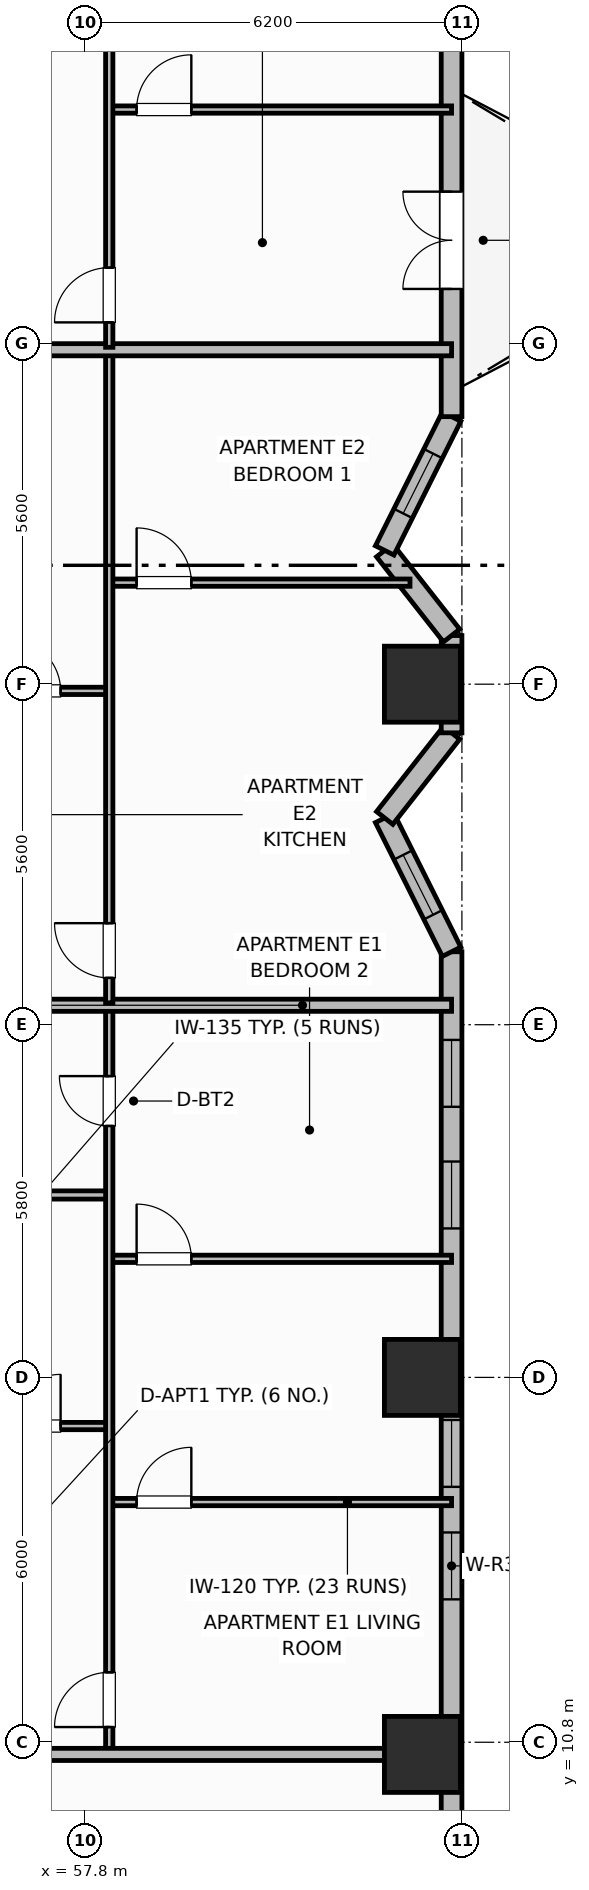
"""IFC4 building model, lengths in metres.
Left out: names, types, materials, properties, quantities, classifications, styles, units other than length and angle.
Written with IfcOpenShell. Run it as: python <this file> out.ifc"""

import sys

from ifc_helpers import new_model, si_unit, direction, frame, frame_2d, origin, origin_2d, place, context, subcontext, project, spatial, rectangle, extrude, element, fill, save


model = new_model("IFC4")
c1 = context("Model", 3, precision=1e-05, world=origin(), true_north=direction((0.0, 1.0)))
c2 = subcontext(c1, "Body", "Model", "MODEL_VIEW")
j1 = project(units=[si_unit("LENGTHUNIT", "METRE"), si_unit("PLANEANGLEUNIT", "RADIAN")], contexts=[c1])
p1 = place(None, origin())
s1 = spatial("IfcSite", under=j1, at=p1, CompositionType="ELEMENT")
p2 = place(p1, origin())
s2 = spatial("IfcBuilding", under=s1, at=p2, CompositionType="ELEMENT")
p3 = place(p2, frame((0.0, 0.0, 69.5)))
s3 = spatial("IfcBuildingStorey", under=s2, at=p3, CompositionType="ELEMENT", Elevation=69.5)
for number, where, z_axis, x_axis in (
    (1, (63.35, 10.6, 0.0), (0.0, 0.0, 1.0), (1.0, 0.0, 0.0)),
    (2, (63.35, 16.8, 0.0), (0.0, 0.0, 1.0), (1.0, 0.0, 0.0)),
    (3, (63.35, 28.2, 0.0), (0.0, 0.0, 1.0), (1.0, 0.0, 0.0)),
):
    element("IfcColumn", number, at=place(p3, frame(where, z_axis=z_axis, x_axis=x_axis)), inside=s3, PredefinedType="COLUMN", context=c2, shape_type="SweptSolid", body=[
        extrude(rectangle(XDim=1.25, YDim=1.25, at=origin_2d()), origin(), (0.0, 0.0, 1.0), 3.7),
    ])
p4 = place(p3, frame((63.83, 9.0, 0.0), z_axis=(0.0, 0.0, 1.0), x_axis=(0.0, 1.0, 0.0)))
e4 = element("IfcWall", 4, at=p4, inside=s3, PredefinedType="SOLIDWALL", context=c2, shape_type="SweptSolid", body=[
    extrude(rectangle(XDim=14.8, YDim=0.34, at=frame_2d((7.4, 0.0))), origin(), (0.0, 0.0, 1.0), 2.7),
])
p5 = place(p4, frame((4.15, 0.0, 0.93)))
e5 = element("IfcOpeningElement", 5, at=p5, cuts=e4, PredefinedType="OPENING", context=c2, shape_type="SweptSolid", body=[
    extrude(rectangle(XDim=1.1, YDim=1.65, at=frame_2d((0.55, 0.825))), frame((0.0, 0.18, 0.0), z_axis=(0.0, -1.0, 0.0), x_axis=(1.0, 0.0, 0.0)), (0.0, 0.0, 1.0), 0.36),
])
p6 = place(p4, frame((6.0, 0.0, 0.89)))
e6 = element("IfcOpeningElement", 6, at=p6, cuts=e4, PredefinedType="OPENING", context=c2, shape_type="SweptSolid", body=[
    extrude(rectangle(XDim=1.1, YDim=1.65, at=frame_2d((0.55, 0.825))), frame((0.0, 0.18, 0.0), z_axis=(0.0, -1.0, 0.0), x_axis=(1.0, 0.0, 0.0)), (0.0, 0.0, 1.0), 0.36),
])
p7 = place(p4, frame((10.25, 0.0, 0.93)))
e7 = element("IfcOpeningElement", 7, at=p7, cuts=e4, PredefinedType="OPENING", context=c2, shape_type="SweptSolid", body=[
    extrude(rectangle(XDim=1.1, YDim=1.65, at=frame_2d((0.55, 0.825))), frame((0.0, 0.18, 0.0), z_axis=(0.0, -1.0, 0.0), x_axis=(1.0, 0.0, 0.0)), (0.0, 0.0, 1.0), 0.36),
])
p8 = place(p4, frame((12.25, 0.0, 0.93)))
e8 = element("IfcOpeningElement", 8, at=p8, cuts=e4, PredefinedType="OPENING", context=c2, shape_type="SweptSolid", body=[
    extrude(rectangle(XDim=1.1, YDim=1.65, at=frame_2d((0.55, 0.825))), frame((0.0, 0.18, 0.0), z_axis=(0.0, -1.0, 0.0), x_axis=(1.0, 0.0, 0.0)), (0.0, 0.0, 1.0), 0.36),
])
p9 = place(p3, frame((63.83, 23.8, 0.0), z_axis=(0.0, 0.0, 1.0), x_axis=(-0.447253297971, 0.894407338663, 0.0)))
e9 = element("IfcWall", 9, at=p9, inside=s3, PredefinedType="SOLIDWALL", context=c2, shape_type="SweptSolid", body=[
    extrude(rectangle(XDim=2.46, YDim=0.34, at=frame_2d((1.23, 0.0))), origin(), (0.0, 0.0, 1.0), 2.7),
])
p10 = place(p9, frame((0.68, 0.0, 0.89)))
e10 = element("IfcOpeningElement", 10, at=p10, cuts=e9, PredefinedType="OPENING", context=c2, shape_type="SweptSolid", body=[
    extrude(rectangle(XDim=1.1, YDim=1.65, at=frame_2d((0.55, 0.825))), frame((0.0, 0.18, 0.0), z_axis=(0.0, -1.0, 0.0), x_axis=(1.0, 0.0, 0.0)), (0.0, 0.0, 1.0), 0.36),
])
p11 = place(p3, frame((62.73, 26.0, 0.0), z_axis=(0.0, 0.0, 1.0), x_axis=(0.617882109729, 0.786270753925, 0.0)))
e11 = element("IfcWall", 11, at=p11, inside=s3, PredefinedType="SOLIDWALL", context=c2, shape_type="SweptSolid", body=[
    extrude(rectangle(XDim=1.781, YDim=0.34, at=frame_2d((0.89, 0.0))), origin(), (0.0, 0.0, 1.0), 2.7),
])
p12 = place(p3, frame((63.83, 27.4, 0.0), z_axis=(0.0, 0.0, 1.0), x_axis=(0.0, 1.0, 0.0)))
e12 = element("IfcWall", 12, at=p12, inside=s3, PredefinedType="SOLIDWALL", context=c2, shape_type="SweptSolid", body=[
    extrude(rectangle(XDim=1.6, YDim=0.34, at=frame_2d((0.8, 0.0))), origin(), (0.0, 0.0, 1.0), 2.7),
])
p13 = place(p3, frame((63.83, 29.0, 0.0), z_axis=(0.0, 0.0, 1.0), x_axis=(-0.617882109729, 0.786270753925, 0.0)))
e13 = element("IfcWall", 13, at=p13, inside=s3, PredefinedType="SOLIDWALL", context=c2, shape_type="SweptSolid", body=[
    extrude(rectangle(XDim=1.781, YDim=0.34, at=frame_2d((0.89, 0.0))), origin(), (0.0, 0.0, 1.0), 2.7),
])
p14 = place(p3, frame((62.73, 30.4, 0.0), z_axis=(0.0, 0.0, 1.0), x_axis=(0.4472135955, 0.894427191, 0.0)))
e14 = element("IfcWall", 14, at=p14, inside=s3, PredefinedType="SOLIDWALL", context=c2, shape_type="SweptSolid", body=[
    extrude(rectangle(XDim=2.46, YDim=0.34, at=frame_2d((1.23, 0.0))), origin(), (0.0, 0.0, 1.0), 2.7),
])
p15 = place(p14, frame((0.68, 0.0, 0.89)))
e15 = element("IfcOpeningElement", 15, at=p15, cuts=e14, PredefinedType="OPENING", context=c2, shape_type="SweptSolid", body=[
    extrude(rectangle(XDim=1.1, YDim=1.65, at=frame_2d((0.55, 0.825))), frame((0.0, 0.18, 0.0), z_axis=(0.0, -1.0, 0.0), x_axis=(1.0, 0.0, 0.0)), (0.0, 0.0, 1.0), 0.36),
])
p16 = place(p3, frame((63.83, 32.6, 0.0), z_axis=(0.0, 0.0, 1.0), x_axis=(0.0, 1.0, 0.0)))
e16 = element("IfcWall", 16, at=p16, inside=s3, PredefinedType="SOLIDWALL", context=c2, shape_type="SweptSolid", body=[
    extrude(rectangle(XDim=14.8, YDim=0.34, at=frame_2d((7.4, 0.0))), origin(), (0.0, 0.0, 1.0), 2.7),
])
p17 = place(p16, frame((2.1, 0.0, 0.0)))
e17 = element("IfcOpeningElement", 17, at=p17, cuts=e16, PredefinedType="OPENING", context=c2, shape_type="SweptSolid", body=[
    extrude(rectangle(XDim=1.6, YDim=2.1, at=frame_2d((0.8, 1.05))), frame((0.0, 0.18, 0.0), z_axis=(0.0, -1.0, 0.0), x_axis=(1.0, 0.0, 0.0)), (0.0, 0.0, 1.0), 0.36),
])
p18 = place(p16, frame((7.68, 0.0, 0.89)))
e18 = element("IfcOpeningElement", 18, at=p18, cuts=e16, PredefinedType="OPENING", context=c2, shape_type="SweptSolid", body=[
    extrude(rectangle(XDim=1.1, YDim=1.65, at=frame_2d((0.55, 0.825))), frame((0.0, 0.18, 0.0), z_axis=(0.0, -1.0, 0.0), x_axis=(1.0, 0.0, 0.0)), (0.0, 0.0, 1.0), 0.36),
])
p19 = place(p16, frame((9.8, 0.0, 0.68)))
e19 = element("IfcOpeningElement", 19, at=p19, cuts=e16, PredefinedType="OPENING", context=c2, shape_type="SweptSolid", body=[
    extrude(rectangle(XDim=2.1, YDim=1.9, at=frame_2d((1.05, 0.95))), frame((0.0, 0.18, 0.0), z_axis=(0.0, -1.0, 0.0), x_axis=(1.0, 0.0, 0.0)), (0.0, 0.0, 1.0), 0.36),
])
p20 = place(p3, frame((55.95, 16.0, 0.0), z_axis=(0.0, 0.0, 1.0), x_axis=(1.0, 0.0, 0.0)))
e20 = element("IfcWall", 20, at=p20, inside=s3, PredefinedType="PARTITIONING", context=c2, shape_type="SweptSolid", body=[
    extrude(rectangle(XDim=2.25, YDim=0.12, at=frame_2d((1.125, 0.0))), origin(), (0.0, 0.0, 1.0), 2.53),
])
p21 = place(p20, frame((0.6, 0.0, 0.0)))
e21 = element("IfcOpeningElement", 21, at=p21, cuts=e20, PredefinedType="OPENING", context=c2, shape_type="SweptSolid", body=[
    extrude(rectangle(XDim=0.85, YDim=2.1, at=frame_2d((0.425, 1.05))), frame((0.0, 0.07, 0.0), z_axis=(0.0, -1.0, 0.0), x_axis=(1.0, 0.0, 0.0)), (0.0, 0.0, 1.0), 0.14),
])
p22 = place(p3, frame((55.95, 19.8, 0.0), z_axis=(0.0, 0.0, 1.0), x_axis=(1.0, 0.0, 0.0)))
e22 = element("IfcWall", 22, at=p22, inside=s3, PredefinedType="PARTITIONING", context=c2, shape_type="SweptSolid", body=[
    extrude(rectangle(XDim=2.25, YDim=0.135, at=frame_2d((1.125, 0.0))), origin(), (0.0, 0.0, 1.0), 2.53),
])
p23 = place(p3, frame((58.2, 14.75, 0.0), z_axis=(0.0, 0.0, 1.0), x_axis=(1.0, 0.0, 0.0)))
e23 = element("IfcWall", 23, at=p23, inside=s3, PredefinedType="PARTITIONING", context=c2, shape_type="SweptSolid", body=[
    extrude(rectangle(XDim=5.63, YDim=0.12, at=frame_2d((2.815, 0.0))), origin(), (0.0, 0.0, 1.0), 2.53),
])
p24 = place(p23, frame((0.45, 0.0, 0.0)))
e24 = element("IfcOpeningElement", 24, at=p24, cuts=e23, PredefinedType="OPENING", context=c2, shape_type="SweptSolid", body=[
    extrude(rectangle(XDim=0.9, YDim=2.1, at=frame_2d((0.45, 1.05))), frame((0.0, 0.07, 0.0), z_axis=(0.0, -1.0, 0.0), x_axis=(1.0, 0.0, 0.0)), (0.0, 0.0, 1.0), 0.14),
])
p25 = place(p3, frame((58.2, 18.75, 0.0), z_axis=(0.0, 0.0, 1.0), x_axis=(1.0, 0.0, 0.0)))
e25 = element("IfcWall", 25, at=p25, inside=s3, PredefinedType="PARTITIONING", context=c2, shape_type="SweptSolid", body=[
    extrude(rectangle(XDim=5.63, YDim=0.12, at=frame_2d((2.815, 0.0))), origin(), (0.0, 0.0, 1.0), 2.53),
])
p26 = place(p25, frame((0.45, 0.0, 0.0)))
e26 = element("IfcOpeningElement", 26, at=p26, cuts=e25, PredefinedType="OPENING", context=c2, shape_type="SweptSolid", body=[
    extrude(rectangle(XDim=0.9, YDim=2.1, at=frame_2d((0.45, 1.05))), frame((0.0, 0.07, 0.0), z_axis=(0.0, -1.0, 0.0), x_axis=(1.0, 0.0, 0.0)), (0.0, 0.0, 1.0), 0.14),
])
p27 = place(p3, frame((58.2, 10.64, 0.0), z_axis=(0.0, 0.0, 1.0), x_axis=(0.0, 1.0, 0.0)))
e27 = element("IfcWall", 27, at=p27, inside=s3, PredefinedType="PARTITIONING", context=c2, shape_type="SweptSolid", body=[
    extrude(rectangle(XDim=12.24, YDim=0.12, at=frame_2d((6.12, 0.0))), origin(), (0.0, 0.0, 1.0), 2.53),
])
p28 = place(p27, frame((0.41, 0.0, 0.0)))
e28 = element("IfcOpeningElement", 28, at=p28, cuts=e27, PredefinedType="OPENING", context=c2, shape_type="SweptSolid", body=[
    extrude(rectangle(XDim=0.9, YDim=2.1, at=frame_2d((0.45, 1.05))), frame((0.0, 0.07, 0.0), z_axis=(0.0, -1.0, 0.0), x_axis=(1.0, 0.0, 0.0)), (0.0, 0.0, 1.0), 0.14),
])
p29 = place(p27, frame((10.295, 0.0, 0.0)))
e29 = element("IfcOpeningElement", 29, at=p29, cuts=e27, PredefinedType="OPENING", context=c2, shape_type="SweptSolid", body=[
    extrude(rectangle(XDim=0.82, YDim=2.08, at=frame_2d((0.41, 1.04))), frame((0.0, 0.07, 0.0), z_axis=(0.0, -1.0, 0.0), x_axis=(1.0, 0.0, 0.0)), (0.0, 0.0, 1.0), 0.14),
])
p30 = place(p3, frame((55.95, 22.92, 0.0), z_axis=(0.0, 0.0, 1.0), x_axis=(1.0, 0.0, 0.0)))
e30 = element("IfcWall", 30, at=p30, inside=s3, PredefinedType="PARTITIONING", context=c2, shape_type="SweptSolid", body=[
    extrude(rectangle(XDim=7.88, YDim=0.2, at=frame_2d((3.94, 0.0))), origin(), (0.0, 0.0, 1.0), 2.53),
])
p31 = place(p3, frame((55.95, 28.09, 0.0), z_axis=(0.0, 0.0, 1.0), x_axis=(1.0, 0.0, 0.0)))
e31 = element("IfcWall", 31, at=p31, inside=s3, PredefinedType="PARTITIONING", context=c2, shape_type="SweptSolid", body=[
    extrude(rectangle(XDim=2.25, YDim=0.12, at=frame_2d((1.125, 0.0))), origin(), (0.0, 0.0, 1.0), 2.53),
])
p32 = place(p31, frame((0.6, 0.0, 0.0)))
e32 = element("IfcOpeningElement", 32, at=p32, cuts=e31, PredefinedType="OPENING", context=c2, shape_type="SweptSolid", body=[
    extrude(rectangle(XDim=0.85, YDim=2.1, at=frame_2d((0.425, 1.05))), frame((0.0, 0.07, 0.0), z_axis=(0.0, -1.0, 0.0), x_axis=(1.0, 0.0, 0.0)), (0.0, 0.0, 1.0), 0.14),
])
p33 = place(p3, frame((58.2, 29.87, 0.0), z_axis=(0.0, 0.0, 1.0), x_axis=(1.0, 0.0, 0.0)))
e33 = element("IfcWall", 33, at=p33, inside=s3, PredefinedType="PARTITIONING", context=c2, shape_type="SweptSolid", body=[
    extrude(rectangle(XDim=4.947, YDim=0.12, at=frame_2d((2.473, 0.0))), origin(), (0.0, 0.0, 1.0), 2.53),
])
p34 = place(p33, frame((0.45, 0.0, 0.0)))
e34 = element("IfcOpeningElement", 34, at=p34, cuts=e33, PredefinedType="OPENING", context=c2, shape_type="SweptSolid", body=[
    extrude(rectangle(XDim=0.9, YDim=2.1, at=frame_2d((0.45, 1.05))), frame((0.0, 0.07, 0.0), z_axis=(0.0, -1.0, 0.0), x_axis=(1.0, 0.0, 0.0)), (0.0, 0.0, 1.0), 0.14),
])
p35 = place(p3, frame((58.2, 22.96, 0.0), z_axis=(0.0, 0.0, 1.0), x_axis=(0.0, 1.0, 0.0)))
e35 = element("IfcWall", 35, at=p35, inside=s3, PredefinedType="PARTITIONING", context=c2, shape_type="SweptSolid", body=[
    extrude(rectangle(XDim=10.7, YDim=0.12, at=frame_2d((5.35, 0.0))), origin(), (0.0, 0.0, 1.0), 2.53),
])
p36 = place(p35, frame((0.41, 0.0, 0.0)))
e36 = element("IfcOpeningElement", 36, at=p36, cuts=e35, PredefinedType="OPENING", context=c2, shape_type="SweptSolid", body=[
    extrude(rectangle(XDim=0.9, YDim=2.1, at=frame_2d((0.45, 1.05))), frame((0.0, 0.07, 0.0), z_axis=(0.0, -1.0, 0.0), x_axis=(1.0, 0.0, 0.0)), (0.0, 0.0, 1.0), 0.14),
])
p37 = place(p3, frame((55.95, 33.7, 0.0), z_axis=(0.0, 0.0, 1.0), x_axis=(1.0, 0.0, 0.0)))
e37 = element("IfcWall", 37, at=p37, inside=s3, PredefinedType="PARTITIONING", context=c2, shape_type="SweptSolid", body=[
    extrude(rectangle(XDim=7.88, YDim=0.2, at=frame_2d((3.94, 0.0))), origin(), (0.0, 0.0, 1.0), 2.53),
])
p38 = place(p3, frame((58.2, 37.65, 0.0), z_axis=(0.0, 0.0, 1.0), x_axis=(1.0, 0.0, 0.0)))
e38 = element("IfcWall", 38, at=p38, inside=s3, PredefinedType="PARTITIONING", context=c2, shape_type="SweptSolid", body=[
    extrude(rectangle(XDim=5.63, YDim=0.12, at=frame_2d((2.815, 0.0))), origin(), (0.0, 0.0, 1.0), 2.53),
])
p39 = place(p38, frame((0.45, 0.0, 0.0)))
e39 = element("IfcOpeningElement", 39, at=p39, cuts=e38, PredefinedType="OPENING", context=c2, shape_type="SweptSolid", body=[
    extrude(rectangle(XDim=0.9, YDim=2.1, at=frame_2d((0.45, 1.05))), frame((0.0, 0.07, 0.0), z_axis=(0.0, -1.0, 0.0), x_axis=(1.0, 0.0, 0.0)), (0.0, 0.0, 1.0), 0.14),
])
p40 = place(p3, frame((58.2, 33.74, 0.0), z_axis=(0.0, 0.0, 1.0), x_axis=(0.0, 1.0, 0.0)))
e40 = element("IfcWall", 40, at=p40, inside=s3, PredefinedType="PARTITIONING", context=c2, shape_type="SweptSolid", body=[
    extrude(rectangle(XDim=12.02, YDim=0.12, at=frame_2d((6.01, 0.0))), origin(), (0.0, 0.0, 1.0), 2.53),
])
p41 = place(p40, frame((0.41, 0.0, 0.0)))
e41 = element("IfcOpeningElement", 41, at=p41, cuts=e40, PredefinedType="OPENING", context=c2, shape_type="SweptSolid", body=[
    extrude(rectangle(XDim=0.9, YDim=2.1, at=frame_2d((0.45, 1.05))), frame((0.0, 0.07, 0.0), z_axis=(0.0, -1.0, 0.0), x_axis=(1.0, 0.0, 0.0)), (0.0, 0.0, 1.0), 0.14),
])
p42 = place(p40, frame((10.185, 0.0, 0.0)))
e42 = element("IfcOpeningElement", 42, at=p42, cuts=e40, PredefinedType="OPENING", context=c2, shape_type="SweptSolid", body=[
    extrude(rectangle(XDim=0.82, YDim=2.08, at=frame_2d((0.41, 1.04))), frame((0.0, 0.07, 0.0), z_axis=(0.0, -1.0, 0.0), x_axis=(1.0, 0.0, 0.0)), (0.0, 0.0, 1.0), 0.14),
])
p43 = place(p3, frame((55.95, 10.6, 0.0), z_axis=(0.0, 0.0, 1.0), x_axis=(1.0, 0.0, 0.0)))
e43 = element("IfcWall", 43, at=p43, inside=s3, PredefinedType="PARTITIONING", context=c2, shape_type="SweptSolid", body=[
    extrude(rectangle(XDim=7.46, YDim=0.2, at=frame_2d((3.73, 0.0))), origin(), (0.0, 0.0, 1.0), 2.53),
])
p44 = place(p5, origin())
e44 = element("IfcWindow", 44, at=p44, inside=s3, PartitioningType="SINGLE_PANEL", PredefinedType="WINDOW", context=c2, shape_type="SweptSolid", body=[
    extrude(rectangle(XDim=1.1, YDim=1.65, at=frame_2d((0.55, 0.825))), frame((0.0, 0.03, 0.0), z_axis=(0.0, -1.0, 0.0), x_axis=(1.0, 0.0, 0.0)), (0.0, 0.0, 1.0), 0.06),
])
fill(e5, e44)
p45 = place(p6, origin())
e45 = element("IfcWindow", 45, at=p45, inside=s3, PartitioningType="SINGLE_PANEL", PredefinedType="WINDOW", context=c2, shape_type="SweptSolid", body=[
    extrude(rectangle(XDim=1.1, YDim=1.65, at=frame_2d((0.55, 0.825))), frame((0.0, 0.03, 0.0), z_axis=(0.0, -1.0, 0.0), x_axis=(1.0, 0.0, 0.0)), (0.0, 0.0, 1.0), 0.06),
])
fill(e6, e45)
p46 = place(p7, origin())
e46 = element("IfcWindow", 46, at=p46, inside=s3, PartitioningType="SINGLE_PANEL", PredefinedType="WINDOW", context=c2, shape_type="SweptSolid", body=[
    extrude(rectangle(XDim=1.1, YDim=1.65, at=frame_2d((0.55, 0.825))), frame((0.0, 0.03, 0.0), z_axis=(0.0, -1.0, 0.0), x_axis=(1.0, 0.0, 0.0)), (0.0, 0.0, 1.0), 0.06),
])
fill(e7, e46)
p47 = place(p8, origin())
e47 = element("IfcWindow", 47, at=p47, inside=s3, PartitioningType="SINGLE_PANEL", PredefinedType="WINDOW", context=c2, shape_type="SweptSolid", body=[
    extrude(rectangle(XDim=1.1, YDim=1.65, at=frame_2d((0.55, 0.825))), frame((0.0, 0.03, 0.0), z_axis=(0.0, -1.0, 0.0), x_axis=(1.0, 0.0, 0.0)), (0.0, 0.0, 1.0), 0.06),
])
fill(e8, e47)
p48 = place(p10, origin())
e48 = element("IfcWindow", 48, at=p48, inside=s3, PartitioningType="SINGLE_PANEL", PredefinedType="WINDOW", context=c2, shape_type="SweptSolid", body=[
    extrude(rectangle(XDim=1.1, YDim=1.65, at=frame_2d((0.55, 0.825))), frame((0.0, 0.03, 0.0), z_axis=(0.0, -1.0, 0.0), x_axis=(1.0, 0.0, 0.0)), (0.0, 0.0, 1.0), 0.06),
])
fill(e10, e48)
p49 = place(p15, origin())
e49 = element("IfcWindow", 49, at=p49, inside=s3, PartitioningType="SINGLE_PANEL", PredefinedType="WINDOW", context=c2, shape_type="SweptSolid", body=[
    extrude(rectangle(XDim=1.1, YDim=1.65, at=frame_2d((0.55, 0.825))), frame((0.0, 0.03, 0.0), z_axis=(0.0, -1.0, 0.0), x_axis=(1.0, 0.0, 0.0)), (0.0, 0.0, 1.0), 0.06),
])
fill(e15, e49)
p50 = place(p17, origin())
e50 = element("IfcDoor", 50, at=p50, inside=s3, OperationType="DOUBLE_DOOR_SINGLE_SWING", PredefinedType="DOOR", context=c2, shape_type="SweptSolid", body=[
    extrude(rectangle(XDim=1.6, YDim=2.1, at=frame_2d((0.8, 1.05))), frame((0.0, 0.025, 0.0), z_axis=(0.0, -1.0, 0.0), x_axis=(1.0, 0.0, 0.0)), (0.0, 0.0, 1.0), 0.05),
])
fill(e17, e50)
p51 = place(p21, origin())
e51 = element("IfcDoor", 51, at=p51, inside=s3, OperationType="SINGLE_SWING_RIGHT", PredefinedType="DOOR", context=c2, shape_type="SweptSolid", body=[
    extrude(rectangle(XDim=0.85, YDim=2.1, at=frame_2d((0.425, 1.05))), frame((0.0, 0.025, 0.0), z_axis=(0.0, -1.0, 0.0), x_axis=(1.0, 0.0, 0.0)), (0.0, 0.0, 1.0), 0.05),
])
fill(e21, e51)
p52 = place(p24, origin())
e52 = element("IfcDoor", 52, at=p52, inside=s3, OperationType="SINGLE_SWING_RIGHT", PredefinedType="DOOR", context=c2, shape_type="SweptSolid", body=[
    extrude(rectangle(XDim=0.9, YDim=2.1, at=frame_2d((0.45, 1.05))), frame((0.0, 0.025, 0.0), z_axis=(0.0, -1.0, 0.0), x_axis=(1.0, 0.0, 0.0)), (0.0, 0.0, 1.0), 0.05),
])
fill(e24, e52)
p53 = place(p26, origin())
e53 = element("IfcDoor", 53, at=p53, inside=s3, OperationType="SINGLE_SWING_LEFT", PredefinedType="DOOR", context=c2, shape_type="SweptSolid", body=[
    extrude(rectangle(XDim=0.9, YDim=2.1, at=frame_2d((0.45, 1.05))), frame((0.0, 0.025, 0.0), z_axis=(0.0, -1.0, 0.0), x_axis=(1.0, 0.0, 0.0)), (0.0, 0.0, 1.0), 0.05),
])
fill(e26, e53)
p54 = place(p28, origin())
e54 = element("IfcDoor", 54, at=p54, inside=s3, OperationType="SINGLE_SWING_LEFT", PredefinedType="DOOR", context=c2, shape_type="SweptSolid", body=[
    extrude(rectangle(XDim=0.9, YDim=2.1, at=frame_2d((0.45, 1.05))), frame((0.0, 0.025, 0.0), z_axis=(0.0, -1.0, 0.0), x_axis=(1.0, 0.0, 0.0)), (0.0, 0.0, 1.0), 0.05),
])
fill(e28, e54)
p55 = place(p29, origin())
e55 = element("IfcDoor", 55, at=p55, inside=s3, OperationType="SINGLE_SWING_RIGHT", PredefinedType="DOOR", context=c2, shape_type="SweptSolid", body=[
    extrude(rectangle(XDim=0.82, YDim=2.08, at=frame_2d((0.41, 1.04))), frame((0.0, 0.025, 0.0), z_axis=(0.0, -1.0, 0.0), x_axis=(1.0, 0.0, 0.0)), (0.0, 0.0, 1.0), 0.05),
])
fill(e29, e55)
p56 = place(p32, origin())
e56 = element("IfcDoor", 56, at=p56, inside=s3, OperationType="SINGLE_SWING_LEFT", PredefinedType="DOOR", context=c2, shape_type="SweptSolid", body=[
    extrude(rectangle(XDim=0.85, YDim=2.1, at=frame_2d((0.425, 1.05))), frame((0.0, 0.025, 0.0), z_axis=(0.0, -1.0, 0.0), x_axis=(1.0, 0.0, 0.0)), (0.0, 0.0, 1.0), 0.05),
])
fill(e32, e56)
p57 = place(p34, origin())
e57 = element("IfcDoor", 57, at=p57, inside=s3, OperationType="SINGLE_SWING_LEFT", PredefinedType="DOOR", context=c2, shape_type="SweptSolid", body=[
    extrude(rectangle(XDim=0.9, YDim=2.1, at=frame_2d((0.45, 1.05))), frame((0.0, 0.025, 0.0), z_axis=(0.0, -1.0, 0.0), x_axis=(1.0, 0.0, 0.0)), (0.0, 0.0, 1.0), 0.05),
])
fill(e34, e57)
p58 = place(p36, origin())
e58 = element("IfcDoor", 58, at=p58, inside=s3, OperationType="SINGLE_SWING_RIGHT", PredefinedType="DOOR", context=c2, shape_type="SweptSolid", body=[
    extrude(rectangle(XDim=0.9, YDim=2.1, at=frame_2d((0.45, 1.05))), frame((0.0, 0.025, 0.0), z_axis=(0.0, -1.0, 0.0), x_axis=(1.0, 0.0, 0.0)), (0.0, 0.0, 1.0), 0.05),
])
fill(e36, e58)
p59 = place(p39, origin())
e59 = element("IfcDoor", 59, at=p59, inside=s3, OperationType="SINGLE_SWING_RIGHT", PredefinedType="DOOR", context=c2, shape_type="SweptSolid", body=[
    extrude(rectangle(XDim=0.9, YDim=2.1, at=frame_2d((0.45, 1.05))), frame((0.0, 0.025, 0.0), z_axis=(0.0, -1.0, 0.0), x_axis=(1.0, 0.0, 0.0)), (0.0, 0.0, 1.0), 0.05),
])
fill(e39, e59)
p60 = place(p41, origin())
e60 = element("IfcDoor", 60, at=p60, inside=s3, OperationType="SINGLE_SWING_LEFT", PredefinedType="DOOR", context=c2, shape_type="SweptSolid", body=[
    extrude(rectangle(XDim=0.9, YDim=2.1, at=frame_2d((0.45, 1.05))), frame((0.0, 0.025, 0.0), z_axis=(0.0, -1.0, 0.0), x_axis=(1.0, 0.0, 0.0)), (0.0, 0.0, 1.0), 0.05),
])
fill(e41, e60)
save(model, sys.argv[1])
